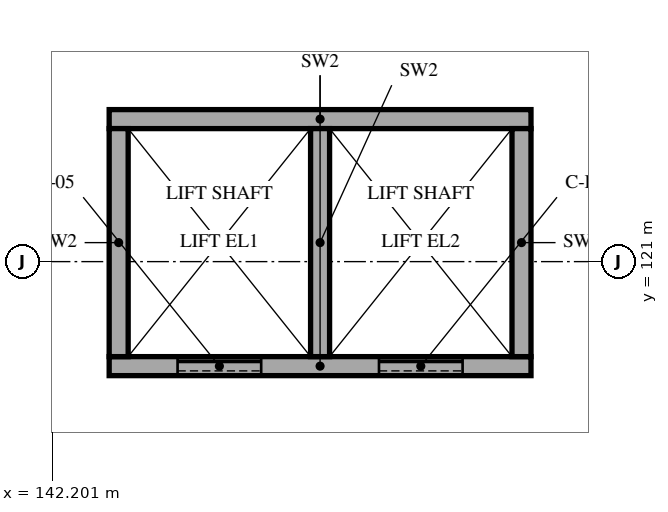
"""IFC4 building model, lengths in metres.
Left out: names, types, materials, properties, quantities, classifications, styles, units other than length and angle.
Written with IfcOpenShell. Run it as: python <this file> out.ifc"""

import sys

from ifc_helpers import new_model, si_unit, direction, frame, frame_2d, origin, place, context, subcontext, project, spatial, rectangle, extrude, element, fill, save


model = new_model("IFC4")
c1 = context("Model", 3, precision=1e-05, world=origin(), true_north=direction((0.0, 1.0)))
c2 = subcontext(c1, "Body", "Model", "MODEL_VIEW")
j1 = project(units=[si_unit("LENGTHUNIT", "METRE"), si_unit("PLANEANGLEUNIT", "RADIAN")], contexts=[c1])
p1 = place(None, origin())
s1 = spatial("IfcSite", under=j1, at=p1, CompositionType="ELEMENT")
p2 = place(p1, origin())
s2 = spatial("IfcBuilding", under=s1, at=p2, CompositionType="ELEMENT")
p3 = place(p2, frame((0.0, 0.0, 10.0)))
s3 = spatial("IfcBuildingStorey", under=s2, at=p3, CompositionType="ELEMENT", Elevation=10.0)
p4 = place(p3, frame((142.95, 119.625, 0.0), z_axis=(0.0, 0.0, 1.0), x_axis=(1.0, 0.0, 0.0)))
e1 = element("IfcWall", 1, at=p4, inside=s3, PredefinedType="SHEAR", context=c2, shape_type="SweptSolid", body=[
    extrude(rectangle(XDim=5.55, YDim=0.25, at=frame_2d((2.775, 0.0))), origin(), (0.0, 0.0, 1.0), 5.0),
])
p5 = place(p4, frame((0.9, 0.0, 0.0)))
e2 = element("IfcOpeningElement", 2, at=p5, cuts=e1, PredefinedType="OPENING", context=c2, shape_type="SweptSolid", body=[
    extrude(rectangle(XDim=1.1, YDim=2.1, at=frame_2d((0.55, 1.05))), frame((0.0, 0.135, 0.0), z_axis=(0.0, -1.0, 0.0), x_axis=(1.0, 0.0, 0.0)), (0.0, 0.0, 1.0), 0.27),
])
p6 = place(p4, frame((3.55, 0.0, 0.0)))
e3 = element("IfcOpeningElement", 3, at=p6, cuts=e1, PredefinedType="OPENING", context=c2, shape_type="SweptSolid", body=[
    extrude(rectangle(XDim=1.1, YDim=2.1, at=frame_2d((0.55, 1.05))), frame((0.0, 0.135, 0.0), z_axis=(0.0, -1.0, 0.0), x_axis=(1.0, 0.0, 0.0)), (0.0, 0.0, 1.0), 0.27),
])
p7 = place(p3, frame((142.95, 122.875, 0.0), z_axis=(0.0, 0.0, 1.0), x_axis=(1.0, 0.0, 0.0)))
e4 = element("IfcWall", 4, at=p7, inside=s3, PredefinedType="SHEAR", context=c2, shape_type="SweptSolid", body=[
    extrude(rectangle(XDim=5.55, YDim=0.25, at=frame_2d((2.775, 0.0))), origin(), (0.0, 0.0, 1.0), 5.0),
])
for number, where, z_axis, x_axis in (
    (5, (143.075, 119.75, 0.0), (0.0, 0.0, 1.0), (0.0, 1.0, 0.0)),
    (6, (148.375, 119.75, 0.0), (0.0, 0.0, 1.0), (0.0, 1.0, 0.0)),
    (7, (145.725, 119.75, 0.0), (0.0, 0.0, 1.0), (0.0, 1.0, 0.0)),
):
    element("IfcWall", number, at=place(p3, frame(where, z_axis=z_axis, x_axis=x_axis)), inside=s3, PredefinedType="SHEAR", context=c2, shape_type="SweptSolid", body=[
        extrude(rectangle(XDim=3.0, YDim=0.25, at=frame_2d((1.5, 0.0))), origin(), (0.0, 0.0, 1.0), 5.0),
    ])
p8 = place(p5, origin())
e8 = element("IfcDoor", 8, at=p8, inside=s3, OperationType="DOUBLE_DOOR_SLIDING", PredefinedType="NOTDEFINED", context=c2, shape_type="SweptSolid", body=[
    extrude(rectangle(XDim=1.1, YDim=2.1, at=frame_2d((0.55, 1.05))), frame((0.0, 0.025, 0.0), z_axis=(0.0, -1.0, 0.0), x_axis=(1.0, 0.0, 0.0)), (0.0, 0.0, 1.0), 0.05),
])
fill(e2, e8)
p9 = place(p6, origin())
e9 = element("IfcDoor", 9, at=p9, inside=s3, OperationType="DOUBLE_DOOR_SLIDING", PredefinedType="NOTDEFINED", context=c2, shape_type="SweptSolid", body=[
    extrude(rectangle(XDim=1.1, YDim=2.1, at=frame_2d((0.55, 1.05))), frame((0.0, 0.025, 0.0), z_axis=(0.0, -1.0, 0.0), x_axis=(1.0, 0.0, 0.0)), (0.0, 0.0, 1.0), 0.05),
])
fill(e3, e9)
save(model, sys.argv[1])
